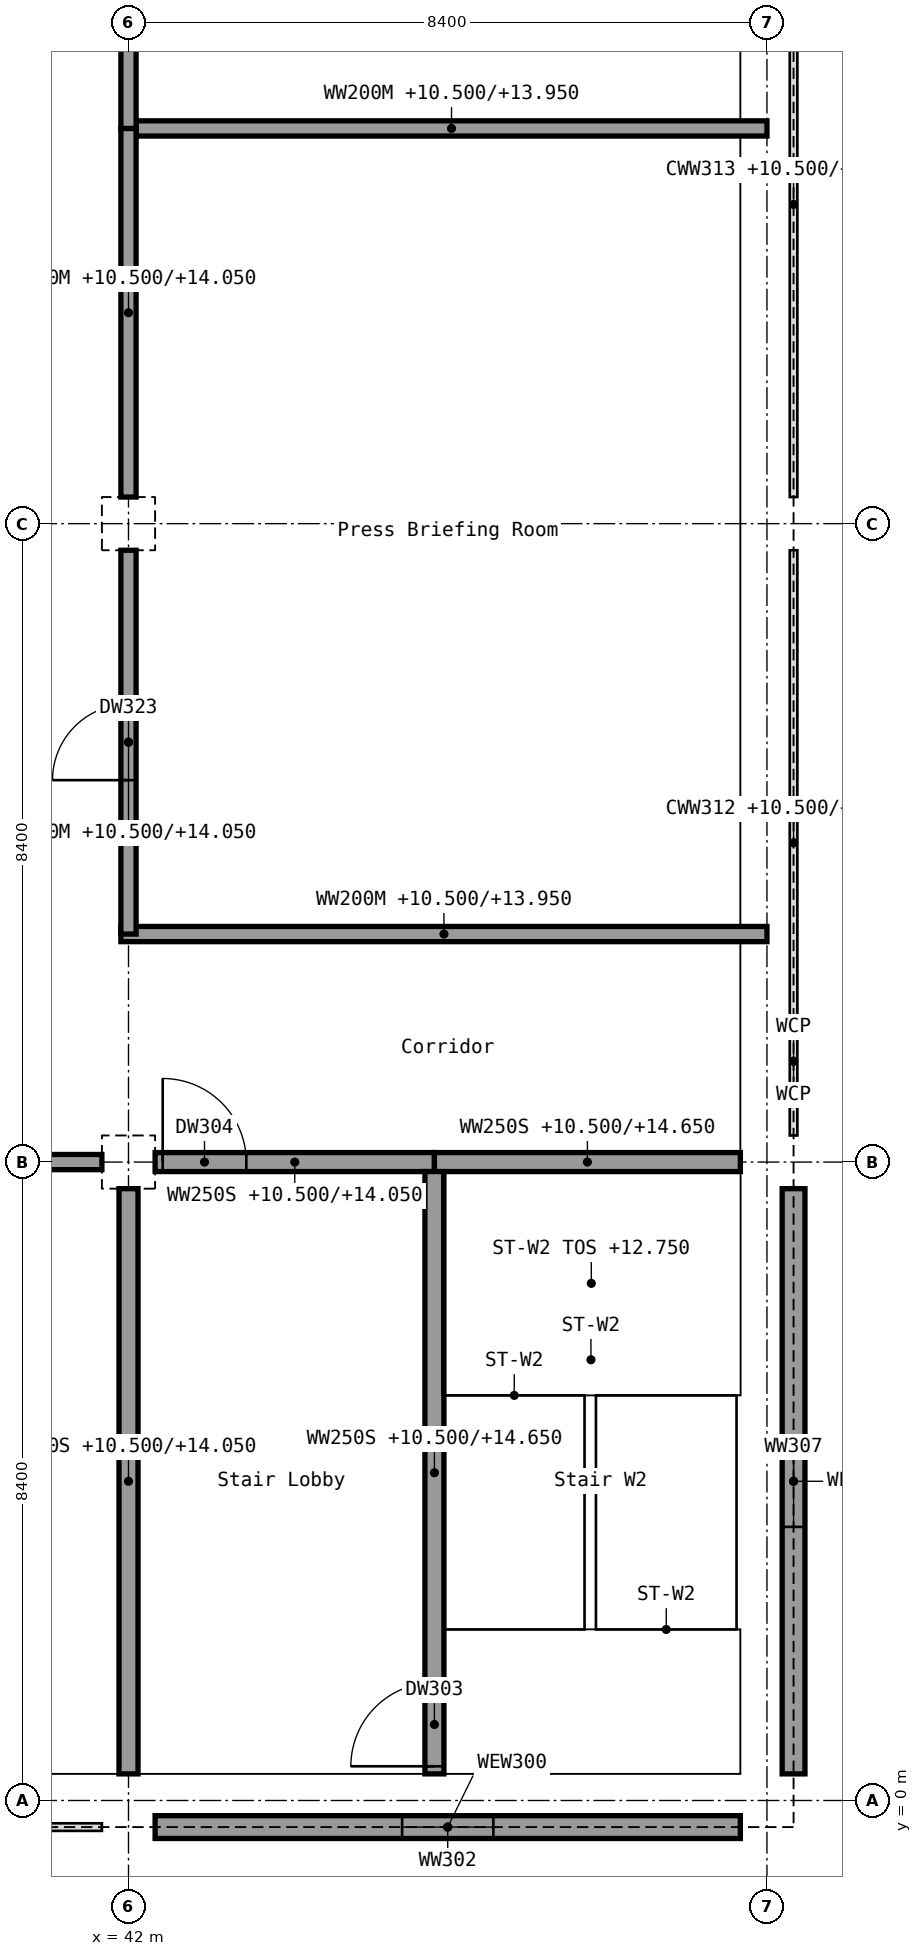
"""IFC4 building model, lengths in metres.
Left out: names, types, materials, properties, quantities, classifications, styles, units other than length and angle.
Written with IfcOpenShell. Run it as: python <this file> out.ifc"""

import sys

from ifc_helpers import new_model, si_unit, direction, frame, frame_2d, origin, origin_2d, place, context, subcontext, project, spatial, rectangle, extrude, element, fill, save


model = new_model("IFC4")
c1 = context("Model", 3, precision=1e-05, world=origin(), true_north=direction((0.0, 1.0)))
c2 = subcontext(c1, "Body", "Model", "MODEL_VIEW")
j1 = project(units=[si_unit("LENGTHUNIT", "METRE"), si_unit("PLANEANGLEUNIT", "RADIAN")], contexts=[c1])
p1 = place(None, origin())
s1 = spatial("IfcSite", under=j1, at=p1, CompositionType="ELEMENT")
p2 = place(p1, origin())
s2 = spatial("IfcBuilding", under=s1, at=p2, CompositionType="ELEMENT")
p3 = place(p2, frame((0.0, 0.0, 10.5)))
s3 = spatial("IfcBuildingStorey", under=s2, at=p3, CompositionType="ELEMENT", Elevation=10.5)
for number, where, z_axis, x_axis in (
    (1, (42.0, 0.0, 0.0), (0.0, 0.0, 1.0), (1.0, 0.0, 0.0)),
    (2, (42.0, 8.4, 0.0), (0.0, 0.0, 1.0), (1.0, 0.0, 0.0)),
    (3, (42.0, 16.8, 0.0), (0.0, 0.0, 1.0), (1.0, 0.0, 0.0)),
    (4, (50.4, 0.0, 0.0), (0.0, 0.0, 1.0), (1.0, 0.0, 0.0)),
    (5, (50.4, 8.4, 0.0), (0.0, 0.0, 1.0), (1.0, 0.0, 0.0)),
    (6, (50.4, 16.8, 0.0), (0.0, 0.0, 1.0), (1.0, 0.0, 0.0)),
):
    element("IfcColumn", number, at=place(p3, frame(where, z_axis=z_axis, x_axis=x_axis)), inside=s3, PredefinedType="COLUMN", context=c2, shape_type="SweptSolid", body=[
        extrude(rectangle(XDim=0.7, YDim=0.7, at=origin_2d()), origin(), (0.0, 0.0, 1.0), 4.5),
    ])
p4 = place(p3, frame((42.35, -0.35, 0.0), z_axis=(0.0, 0.0, 1.0), x_axis=(1.0, 0.0, 0.0)))
e7 = element("IfcWall", 7, at=p4, inside=s3, PredefinedType="SOLIDWALL", context=c2, shape_type="SweptSolid", body=[
    extrude(rectangle(XDim=7.7, YDim=0.3, at=frame_2d((3.85, 0.0))), origin(), (0.0, 0.0, 1.0), 3.8),
])
p5 = place(p4, frame((3.25, 0.0, 1.0)))
e8 = element("IfcOpeningElement", 8, at=p5, cuts=e7, PredefinedType="OPENING", context=c2, shape_type="SweptSolid", body=[
    extrude(rectangle(XDim=1.2, YDim=1.5, at=frame_2d((0.6, 0.75))), frame((0.0, 0.15, 0.0), z_axis=(0.0, -1.0, 0.0), x_axis=(1.0, 0.0, 0.0)), (0.0, 0.0, 1.0), 0.3),
])
p6 = place(p3, frame((50.75, 0.35, 0.0), z_axis=(0.0, 0.0, 1.0), x_axis=(0.0, 1.0, 0.0)))
e9 = element("IfcWall", 9, at=p6, inside=s3, PredefinedType="SOLIDWALL", context=c2, shape_type="SweptSolid", body=[
    extrude(rectangle(XDim=7.7, YDim=0.3, at=frame_2d((3.85, 0.0))), origin(), (0.0, 0.0, 1.0), 3.8),
])
p7 = place(p6, frame((3.25, 0.0, 1.0)))
e10 = element("IfcOpeningElement", 10, at=p7, cuts=e9, PredefinedType="OPENING", context=c2, shape_type="SweptSolid", body=[
    extrude(rectangle(XDim=1.2, YDim=1.5, at=frame_2d((0.6, 0.75))), frame((0.0, 0.15, 0.0), z_axis=(0.0, -1.0, 0.0), x_axis=(1.0, 0.0, 0.0)), (0.0, 0.0, 1.0), 0.3),
])
p8 = place(p3, frame((33.95, 8.4, 0.0), z_axis=(0.0, 0.0, 1.0), x_axis=(1.0, 0.0, 0.0)))
e11 = element("IfcWall", 11, at=p8, inside=s3, PredefinedType="PARTITIONING", context=c2, shape_type="SweptSolid", body=[
    extrude(rectangle(XDim=7.7, YDim=0.2, at=frame_2d((3.85, 0.0))), origin(), (0.0, 0.0, 1.0), 3.55),
])
p9 = place(p3, frame((42.35, 8.4, 0.0), z_axis=(0.0, 0.0, 1.0), x_axis=(1.0, 0.0, 0.0)))
e12 = element("IfcWall", 12, at=p9, inside=s3, PredefinedType="SHEAR", context=c2, shape_type="SweptSolid", body=[
    extrude(rectangle(XDim=3.675, YDim=0.25, at=frame_2d((1.837, 0.0))), origin(), (0.0, 0.0, 1.0), 3.55),
])
p10 = place(p9, frame((0.1, 0.0, 0.0)))
e13 = element("IfcOpeningElement", 13, at=p10, cuts=e12, PredefinedType="OPENING", context=c2, shape_type="SweptSolid", body=[
    extrude(rectangle(XDim=1.1, YDim=2.1, at=frame_2d((0.55, 1.05))), frame((0.0, 0.125, 0.0), z_axis=(0.0, -1.0, 0.0), x_axis=(1.0, 0.0, 0.0)), (0.0, 0.0, 1.0), 0.25),
])
p11 = place(p3, frame((46.025, 8.4, 0.0), z_axis=(0.0, 0.0, 1.0), x_axis=(1.0, 0.0, 0.0)))
e14 = element("IfcWall", 14, at=p11, inside=s3, PredefinedType="SHEAR", context=c2, shape_type="SweptSolid", body=[
    extrude(rectangle(XDim=4.025, YDim=0.25, at=frame_2d((2.013, 0.0))), origin(), (0.0, 0.0, 1.0), 4.15),
])
p12 = place(p3, frame((41.9, 11.4, 0.0), z_axis=(0.0, 0.0, 1.0), x_axis=(1.0, 0.0, 0.0)))
e15 = element("IfcWall", 15, at=p12, inside=s3, PredefinedType="PARTITIONING", context=c2, shape_type="SweptSolid", body=[
    extrude(rectangle(XDim=8.5, YDim=0.2, at=frame_2d((4.25, 0.0))), origin(), (0.0, 0.0, 1.0), 3.45),
])
p13 = place(p3, frame((42.1, 22.0, 0.0), z_axis=(0.0, 0.0, 1.0), x_axis=(1.0, 0.0, 0.0)))
e16 = element("IfcWall", 16, at=p13, inside=s3, PredefinedType="PARTITIONING", context=c2, shape_type="SweptSolid", body=[
    extrude(rectangle(XDim=8.3, YDim=0.2, at=frame_2d((4.15, 0.0))), origin(), (0.0, 0.0, 1.0), 3.45),
])
p14 = place(p3, frame((42.0, 0.35, 0.0), z_axis=(0.0, 0.0, 1.0), x_axis=(0.0, 1.0, 0.0)))
e17 = element("IfcWall", 17, at=p14, inside=s3, PredefinedType="SHEAR", context=c2, shape_type="SweptSolid", body=[
    extrude(rectangle(XDim=7.7, YDim=0.25, at=frame_2d((3.85, 0.0))), origin(), (0.0, 0.0, 1.0), 3.55),
])
p15 = place(p3, frame((42.0, 11.4, 0.0), z_axis=(0.0, 0.0, 1.0), x_axis=(0.0, 1.0, 0.0)))
e18 = element("IfcWall", 18, at=p15, inside=s3, PredefinedType="PARTITIONING", context=c2, shape_type="SweptSolid", body=[
    extrude(rectangle(XDim=5.05, YDim=0.2, at=frame_2d((2.525, 0.0))), origin(), (0.0, 0.0, 1.0), 3.55),
])
p16 = place(p15, frame((2.025, 0.0, 0.0)))
e19 = element("IfcOpeningElement", 19, at=p16, cuts=e18, PredefinedType="OPENING", context=c2, shape_type="SweptSolid", body=[
    extrude(rectangle(XDim=1.0, YDim=2.1, at=frame_2d((0.5, 1.05))), frame((0.0, 0.1, 0.0), z_axis=(0.0, -1.0, 0.0), x_axis=(1.0, 0.0, 0.0)), (0.0, 0.0, 1.0), 0.2),
])
p17 = place(p3, frame((42.0, 17.15, 0.0), z_axis=(0.0, 0.0, 1.0), x_axis=(0.0, 1.0, 0.0)))
e20 = element("IfcWall", 20, at=p17, inside=s3, PredefinedType="PARTITIONING", context=c2, shape_type="SweptSolid", body=[
    extrude(rectangle(XDim=4.85, YDim=0.2, at=frame_2d((2.425, 0.0))), origin(), (0.0, 0.0, 1.0), 3.55),
])
p18 = place(p3, frame((42.0, 22.0, 0.0), z_axis=(0.0, 0.0, 1.0), x_axis=(0.0, 1.0, 0.0)))
e21 = element("IfcWall", 21, at=p18, inside=s3, PredefinedType="PARTITIONING", context=c2, shape_type="SweptSolid", body=[
    extrude(rectangle(XDim=2.85, YDim=0.2, at=frame_2d((1.425, 0.0))), origin(), (0.0, 0.0, 1.0), 3.55),
])
p19 = place(p3, frame((46.025, 0.35, 0.0), z_axis=(0.0, 0.0, 1.0), x_axis=(0.0, 1.0, 0.0)))
e22 = element("IfcWall", 22, at=p19, inside=s3, PredefinedType="SHEAR", context=c2, shape_type="SweptSolid", body=[
    extrude(rectangle(XDim=7.925, YDim=0.25, at=frame_2d((3.962, 0.0))), origin(), (0.0, 0.0, 1.0), 4.15),
])
p20 = place(p19, frame((0.1, 0.0, 0.0)))
e23 = element("IfcOpeningElement", 23, at=p20, cuts=e22, PredefinedType="OPENING", context=c2, shape_type="SweptSolid", body=[
    extrude(rectangle(XDim=1.1, YDim=2.1, at=frame_2d((0.55, 1.05))), frame((0.0, 0.125, 0.0), z_axis=(0.0, -1.0, 0.0), x_axis=(1.0, 0.0, 0.0)), (0.0, 0.0, 1.0), 0.25),
])
p21 = place(p5, origin())
e24 = element("IfcWindow", 24, at=p21, inside=s3, PartitioningType="SINGLE_PANEL", PredefinedType="WINDOW", context=c2, shape_type="SweptSolid", body=[
    extrude(rectangle(XDim=1.2, YDim=1.5, at=frame_2d((0.6, 0.75))), frame((0.0, 0.03, 0.0), z_axis=(0.0, -1.0, 0.0), x_axis=(1.0, 0.0, 0.0)), (0.0, 0.0, 1.0), 0.06),
])
fill(e8, e24)
p22 = place(p7, origin())
e25 = element("IfcWindow", 25, at=p22, inside=s3, PartitioningType="SINGLE_PANEL", PredefinedType="WINDOW", context=c2, shape_type="SweptSolid", body=[
    extrude(rectangle(XDim=1.2, YDim=1.5, at=frame_2d((0.6, 0.75))), frame((0.0, 0.03, 0.0), z_axis=(0.0, -1.0, 0.0), x_axis=(1.0, 0.0, 0.0)), (0.0, 0.0, 1.0), 0.06),
])
fill(e10, e25)
p23 = place(p20, origin())
e26 = element("IfcDoor", 26, at=p23, inside=s3, OperationType="SINGLE_SWING_LEFT", PredefinedType="DOOR", context=c2, shape_type="SweptSolid", body=[
    extrude(rectangle(XDim=1.1, YDim=2.1, at=frame_2d((0.55, 1.05))), frame((0.0, 0.025, 0.0), z_axis=(0.0, -1.0, 0.0), x_axis=(1.0, 0.0, 0.0)), (0.0, 0.0, 1.0), 0.05),
])
fill(e23, e26)
p24 = place(p10, origin())
e27 = element("IfcDoor", 27, at=p24, inside=s3, OperationType="SINGLE_SWING_LEFT", PredefinedType="DOOR", context=c2, shape_type="SweptSolid", body=[
    extrude(rectangle(XDim=1.1, YDim=2.1, at=frame_2d((0.55, 1.05))), frame((0.0, 0.025, 0.0), z_axis=(0.0, -1.0, 0.0), x_axis=(1.0, 0.0, 0.0)), (0.0, 0.0, 1.0), 0.05),
])
fill(e13, e27)
p25 = place(p16, origin())
e28 = element("IfcDoor", 28, at=p25, inside=s3, OperationType="SINGLE_SWING_LEFT", PredefinedType="DOOR", context=c2, shape_type="SweptSolid", body=[
    extrude(rectangle(XDim=1.0, YDim=2.1, at=frame_2d((0.5, 1.05))), frame((0.0, 0.025, 0.0), z_axis=(0.0, -1.0, 0.0), x_axis=(1.0, 0.0, 0.0)), (0.0, 0.0, 1.0), 0.05),
])
fill(e19, e28)
save(model, sys.argv[1])
